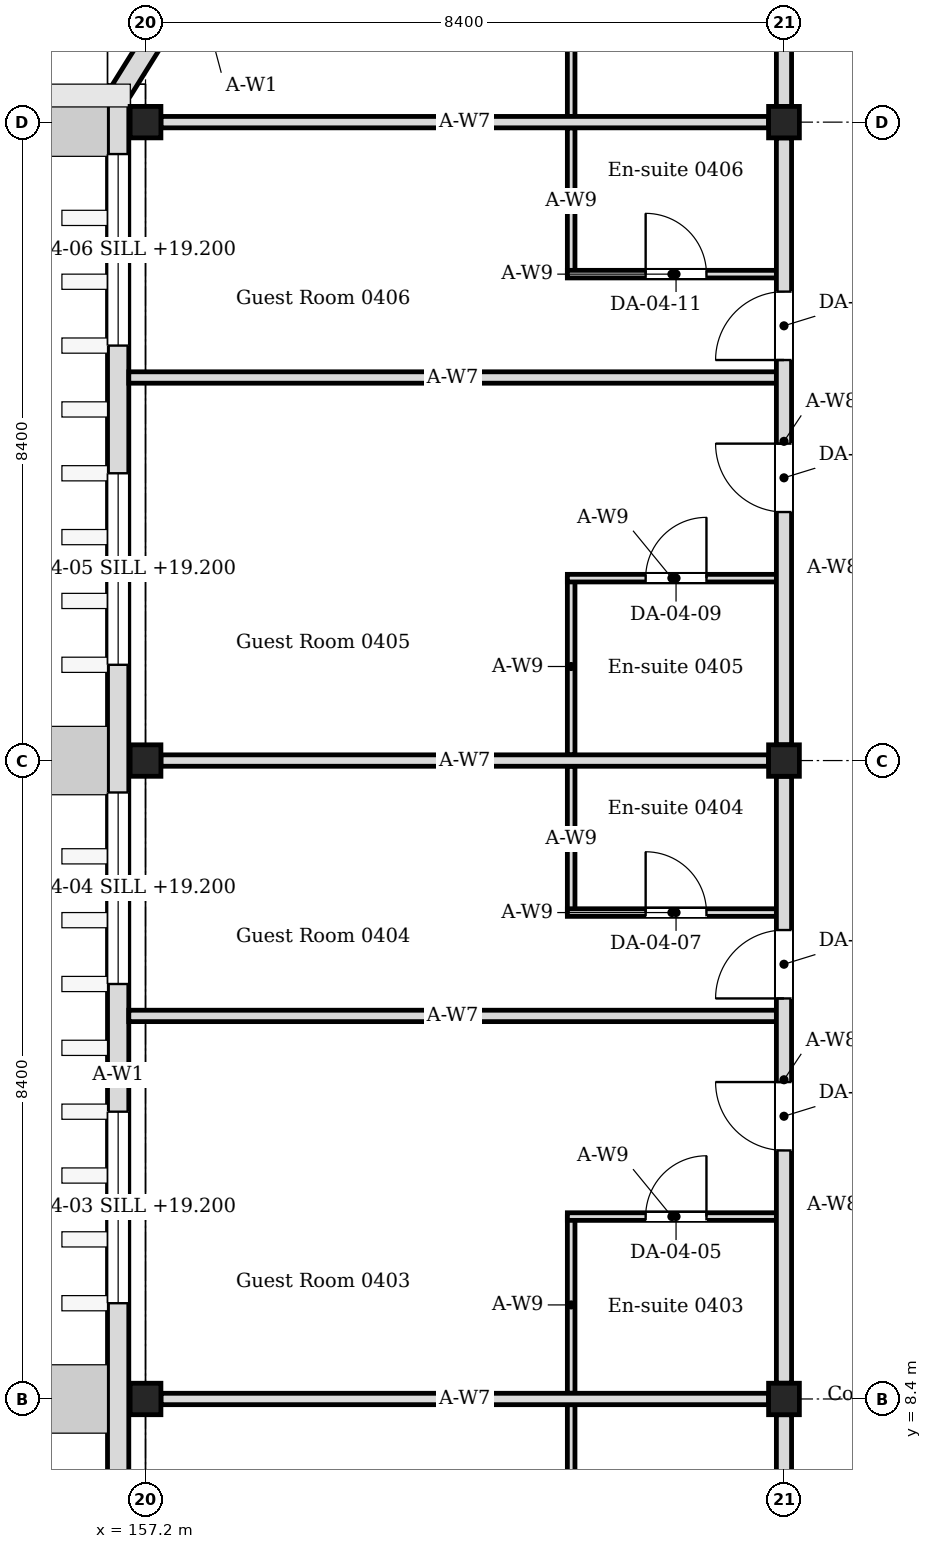
"""IFC4 building model, lengths in metres.
Left out: names, types, materials, properties, quantities, classifications, styles, units other than length and angle.
Written with IfcOpenShell. Run it as: python <this file> out.ifc"""

import sys

from ifc_helpers import new_model, si_unit, direction, frame, frame_2d, origin, origin_2d, place, context, subcontext, project, spatial, rectangle, i_section, extrude, element, fill, save


model = new_model("IFC4")
c1 = context("Model", 3, precision=1e-05, world=origin(), true_north=direction((0.0, 1.0)))
c2 = subcontext(c1, "Body", "Model", "MODEL_VIEW")
j1 = project(units=[si_unit("LENGTHUNIT", "METRE"), si_unit("PLANEANGLEUNIT", "RADIAN")], contexts=[c1])
p1 = place(None, origin())
s1 = spatial("IfcSite", under=j1, at=p1, CompositionType="ELEMENT")
p2 = place(p1, origin())
s2 = spatial("IfcBuilding", under=s1, at=p2, CompositionType="ELEMENT")
p3 = place(p2, frame((0.0, 0.0, 18.6)))
s3 = spatial("IfcBuildingStorey", under=s2, at=p3, CompositionType="ELEMENT", Elevation=18.6)
for number, where, z_axis, x_axis in (
    (1, (157.2, 8.4, 0.0), (0.0, 0.0, 1.0), (1.0, 0.0, 0.0)),
    (2, (157.2, 16.8, 0.0), (0.0, 0.0, 1.0), (1.0, 0.0, 0.0)),
    (3, (157.2, 25.2, 0.0), (0.0, 0.0, 1.0), (1.0, 0.0, 0.0)),
    (4, (165.6, 8.4, 0.0), (0.0, 0.0, 1.0), (1.0, 0.0, 0.0)),
    (5, (165.6, 16.8, 0.0), (0.0, 0.0, 1.0), (1.0, 0.0, 0.0)),
    (6, (165.6, 25.2, 0.0), (0.0, 0.0, 1.0), (1.0, 0.0, 0.0)),
):
    element("IfcColumn", number, at=place(p3, frame(where, z_axis=z_axis, x_axis=x_axis)), inside=s3, PredefinedType="COLUMN", context=c2, shape_type="SweptSolid", body=[
        extrude(i_section(OverallWidth=0.405, OverallDepth=0.414, WebThickness=0.018, FlangeThickness=0.028, FilletRadius=0.022, at=origin_2d()), origin(), (0.0, 0.0, 1.0), 4.2),
    ])
p4 = place(p3, frame((156.84, -0.22, 0.0), z_axis=(0.0, 0.0, 1.0), x_axis=(0.0, 1.0, 0.0)))
e7 = element("IfcWall", 7, at=p4, inside=s3, PredefinedType="SOLIDWALL", context=c2, shape_type="SweptSolid", body=[
    extrude(rectangle(XDim=25.77, YDim=0.28, at=frame_2d((12.885, 0.0))), origin(), (0.0, 0.0, 1.0), 4.05),
])
p5 = place(p4, frame((0.64, 0.0, 0.6)))
e8 = element("IfcOpeningElement", 8, at=p5, cuts=e7, PredefinedType="OPENING", context=c2, shape_type="SweptSolid", body=[
    extrude(rectangle(XDim=2.52, YDim=2.4, at=frame_2d((1.26, 1.2))), frame((0.0, 0.15, 0.0), z_axis=(0.0, -1.0, 0.0), x_axis=(1.0, 0.0, 0.0)), (0.0, 0.0, 1.0), 0.3),
])
p6 = place(p4, frame((4.84, 0.0, 0.6)))
e9 = element("IfcOpeningElement", 9, at=p6, cuts=e7, PredefinedType="OPENING", context=c2, shape_type="SweptSolid", body=[
    extrude(rectangle(XDim=2.52, YDim=2.4, at=frame_2d((1.26, 1.2))), frame((0.0, 0.15, 0.0), z_axis=(0.0, -1.0, 0.0), x_axis=(1.0, 0.0, 0.0)), (0.0, 0.0, 1.0), 0.3),
])
p7 = place(p4, frame((9.88, 0.0, 0.6)))
e10 = element("IfcOpeningElement", 10, at=p7, cuts=e7, PredefinedType="OPENING", context=c2, shape_type="SweptSolid", body=[
    extrude(rectangle(XDim=2.52, YDim=2.4, at=frame_2d((1.26, 1.2))), frame((0.0, 0.15, 0.0), z_axis=(0.0, -1.0, 0.0), x_axis=(1.0, 0.0, 0.0)), (0.0, 0.0, 1.0), 0.3),
])
p8 = place(p4, frame((14.08, 0.0, 0.6)))
e11 = element("IfcOpeningElement", 11, at=p8, cuts=e7, PredefinedType="OPENING", context=c2, shape_type="SweptSolid", body=[
    extrude(rectangle(XDim=2.52, YDim=2.4, at=frame_2d((1.26, 1.2))), frame((0.0, 0.15, 0.0), z_axis=(0.0, -1.0, 0.0), x_axis=(1.0, 0.0, 0.0)), (0.0, 0.0, 1.0), 0.3),
])
p9 = place(p4, frame((18.28, 0.0, 0.6)))
e12 = element("IfcOpeningElement", 12, at=p9, cuts=e7, PredefinedType="OPENING", context=c2, shape_type="SweptSolid", body=[
    extrude(rectangle(XDim=2.52, YDim=2.4, at=frame_2d((1.26, 1.2))), frame((0.0, 0.15, 0.0), z_axis=(0.0, -1.0, 0.0), x_axis=(1.0, 0.0, 0.0)), (0.0, 0.0, 1.0), 0.3),
])
p10 = place(p4, frame((22.48, 0.0, 0.6)))
e13 = element("IfcOpeningElement", 13, at=p10, cuts=e7, PredefinedType="OPENING", context=c2, shape_type="SweptSolid", body=[
    extrude(rectangle(XDim=2.52, YDim=2.4, at=frame_2d((1.26, 1.2))), frame((0.0, 0.15, 0.0), z_axis=(0.0, -1.0, 0.0), x_axis=(1.0, 0.0, 0.0)), (0.0, 0.0, 1.0), 0.3),
])
p11 = place(p3, frame((156.886, 25.624, 0.0), z_axis=(0.0, 0.0, 1.0), x_axis=(0.528992500338, 0.848626498871, 0.0)))
e14 = element("IfcWall", 14, at=p11, inside=s3, PredefinedType="SOLIDWALL", context=c2, shape_type="SweptSolid", body=[
    extrude(rectangle(XDim=4.145, YDim=0.28, at=frame_2d((2.072, 0.0))), origin(), (0.0, 0.0, 1.0), 4.05),
])
p12 = place(p11, frame((0.812, 0.0, 0.6)))
e15 = element("IfcOpeningElement", 15, at=p12, cuts=e14, PredefinedType="OPENING", context=c2, shape_type="SweptSolid", body=[
    extrude(rectangle(XDim=2.52, YDim=2.4, at=frame_2d((1.26, 1.2))), frame((0.0, 0.15, 0.0), z_axis=(0.0, -1.0, 0.0), x_axis=(1.0, 0.0, 0.0)), (0.0, 0.0, 1.0), 0.3),
])
for number, where, z_axis, x_axis in (
    (16, (162.8, 6.0, 0.0), (0.0, 0.0, 1.0), (0.0, 1.0, 0.0)),
    (17, (162.8, 8.475, 0.0), (0.0, 0.0, 1.0), (0.0, 1.0, 0.0)),
):
    element("IfcWall", number, at=place(p3, frame(where, z_axis=z_axis, x_axis=x_axis)), inside=s3, PredefinedType="PARTITIONING", context=c2, shape_type="SweptSolid", body=[
        extrude(rectangle(XDim=2.325, YDim=0.1, at=frame_2d((1.163, 0.0))), origin(), (0.0, 0.0, 1.0), 4.05),
    ])
p13 = place(p3, frame((162.75, 10.8, 0.0), z_axis=(0.0, 0.0, 1.0), x_axis=(1.0, 0.0, 0.0)))
e18 = element("IfcWall", 18, at=p13, inside=s3, PredefinedType="PARTITIONING", context=c2, shape_type="SweptSolid", body=[
    extrude(rectangle(XDim=2.75, YDim=0.1, at=frame_2d((1.375, 0.0))), origin(), (0.0, 0.0, 1.0), 4.05),
])
p14 = place(p13, frame((1.03, 0.0, 0.0)))
e19 = element("IfcOpeningElement", 19, at=p14, cuts=e18, PredefinedType="OPENING", context=c2, shape_type="SweptSolid", body=[
    extrude(rectangle(XDim=0.8, YDim=2.1, at=frame_2d((0.4, 1.05))), frame((0.0, 0.06, 0.0), z_axis=(0.0, -1.0, 0.0), x_axis=(1.0, 0.0, 0.0)), (0.0, 0.0, 1.0), 0.12),
])
p15 = place(p3, frame((162.8, 14.8, 0.0), z_axis=(0.0, 0.0, 1.0), x_axis=(0.0, 1.0, 0.0)))
e20 = element("IfcWall", 20, at=p15, inside=s3, PredefinedType="PARTITIONING", context=c2, shape_type="SweptSolid", body=[
    extrude(rectangle(XDim=1.925, YDim=0.1, at=frame_2d((0.962, 0.0))), origin(), (0.0, 0.0, 1.0), 4.05),
])
p16 = place(p3, frame((162.75, 14.8, 0.0), z_axis=(0.0, 0.0, 1.0), x_axis=(1.0, 0.0, 0.0)))
e21 = element("IfcWall", 21, at=p16, inside=s3, PredefinedType="PARTITIONING", context=c2, shape_type="SweptSolid", body=[
    extrude(rectangle(XDim=2.75, YDim=0.1, at=frame_2d((1.375, 0.0))), origin(), (0.0, 0.0, 1.0), 4.05),
])
p17 = place(p16, frame((1.03, 0.0, 0.0)))
e22 = element("IfcOpeningElement", 22, at=p17, cuts=e21, PredefinedType="OPENING", context=c2, shape_type="SweptSolid", body=[
    extrude(rectangle(XDim=0.8, YDim=2.1, at=frame_2d((0.4, 1.05))), frame((0.0, 0.06, 0.0), z_axis=(0.0, -1.0, 0.0), x_axis=(1.0, 0.0, 0.0)), (0.0, 0.0, 1.0), 0.12),
])
p18 = place(p3, frame((162.8, 16.875, 0.0), z_axis=(0.0, 0.0, 1.0), x_axis=(0.0, 1.0, 0.0)))
e23 = element("IfcWall", 23, at=p18, inside=s3, PredefinedType="PARTITIONING", context=c2, shape_type="SweptSolid", body=[
    extrude(rectangle(XDim=2.325, YDim=0.1, at=frame_2d((1.163, 0.0))), origin(), (0.0, 0.0, 1.0), 4.05),
])
p19 = place(p3, frame((162.75, 19.2, 0.0), z_axis=(0.0, 0.0, 1.0), x_axis=(1.0, 0.0, 0.0)))
e24 = element("IfcWall", 24, at=p19, inside=s3, PredefinedType="PARTITIONING", context=c2, shape_type="SweptSolid", body=[
    extrude(rectangle(XDim=2.75, YDim=0.1, at=frame_2d((1.375, 0.0))), origin(), (0.0, 0.0, 1.0), 4.05),
])
p20 = place(p19, frame((1.03, 0.0, 0.0)))
e25 = element("IfcOpeningElement", 25, at=p20, cuts=e24, PredefinedType="OPENING", context=c2, shape_type="SweptSolid", body=[
    extrude(rectangle(XDim=0.8, YDim=2.1, at=frame_2d((0.4, 1.05))), frame((0.0, 0.06, 0.0), z_axis=(0.0, -1.0, 0.0), x_axis=(1.0, 0.0, 0.0)), (0.0, 0.0, 1.0), 0.12),
])
p21 = place(p3, frame((162.8, 23.2, 0.0), z_axis=(0.0, 0.0, 1.0), x_axis=(0.0, 1.0, 0.0)))
e26 = element("IfcWall", 26, at=p21, inside=s3, PredefinedType="PARTITIONING", context=c2, shape_type="SweptSolid", body=[
    extrude(rectangle(XDim=1.925, YDim=0.1, at=frame_2d((0.962, 0.0))), origin(), (0.0, 0.0, 1.0), 4.05),
])
p22 = place(p3, frame((162.75, 23.2, 0.0), z_axis=(0.0, 0.0, 1.0), x_axis=(1.0, 0.0, 0.0)))
e27 = element("IfcWall", 27, at=p22, inside=s3, PredefinedType="PARTITIONING", context=c2, shape_type="SweptSolid", body=[
    extrude(rectangle(XDim=2.75, YDim=0.1, at=frame_2d((1.375, 0.0))), origin(), (0.0, 0.0, 1.0), 4.05),
])
p23 = place(p22, frame((1.03, 0.0, 0.0)))
e28 = element("IfcOpeningElement", 28, at=p23, cuts=e27, PredefinedType="OPENING", context=c2, shape_type="SweptSolid", body=[
    extrude(rectangle(XDim=0.8, YDim=2.1, at=frame_2d((0.4, 1.05))), frame((0.0, 0.06, 0.0), z_axis=(0.0, -1.0, 0.0), x_axis=(1.0, 0.0, 0.0)), (0.0, 0.0, 1.0), 0.12),
])
p24 = place(p3, frame((162.8, 25.275, 0.0), z_axis=(0.0, 0.0, 1.0), x_axis=(0.0, 1.0, 0.0)))
e29 = element("IfcWall", 29, at=p24, inside=s3, PredefinedType="PARTITIONING", context=c2, shape_type="SweptSolid", body=[
    extrude(rectangle(XDim=2.325, YDim=0.1, at=frame_2d((1.163, 0.0))), origin(), (0.0, 0.0, 1.0), 4.05),
])
for number, where, z_axis, x_axis in (
    (30, (157.403, 8.4, 0.0), (0.0, 0.0, 1.0), (1.0, 0.0, 0.0)),
    (31, (157.403, 16.8, 0.0), (0.0, 0.0, 1.0), (1.0, 0.0, 0.0)),
    (32, (157.403, 25.2, 0.0), (0.0, 0.0, 1.0), (1.0, 0.0, 0.0)),
):
    element("IfcWall", number, at=place(p3, frame(where, z_axis=z_axis, x_axis=x_axis)), inside=s3, PredefinedType="PARTITIONING", context=c2, shape_type="SweptSolid", body=[
        extrude(rectangle(XDim=7.995, YDim=0.15, at=frame_2d((3.998, 0.0))), origin(), (0.0, 0.0, 1.0), 3.604),
    ])
for number, where, z_axis, x_axis in (
    (33, (156.98, 13.44, 0.0), (0.0, 0.0, 1.0), (1.0, 0.0, 0.0)),
    (34, (156.98, 21.84, 0.0), (0.0, 0.0, 1.0), (1.0, 0.0, 0.0)),
):
    element("IfcWall", number, at=place(p3, frame(where, z_axis=z_axis, x_axis=x_axis)), inside=s3, PredefinedType="PARTITIONING", context=c2, shape_type="SweptSolid", body=[
        extrude(rectangle(XDim=8.52, YDim=0.15, at=frame_2d((4.26, 0.0))), origin(), (0.0, 0.0, 1.0), 3.604),
    ])
p25 = place(p3, frame((165.6, 0.207, 0.0), z_axis=(0.0, 0.0, 1.0), x_axis=(0.0, 1.0, 0.0)))
e35 = element("IfcWall", 35, at=p25, inside=s3, PredefinedType="PARTITIONING", context=c2, shape_type="SweptSolid", body=[
    extrude(rectangle(XDim=7.986, YDim=0.2, at=frame_2d((3.993, 0.0))), origin(), (0.0, 0.0, 1.0), 3.45),
])
p26 = place(p25, frame((2.023, 0.0, 0.0)))
e36 = element("IfcOpeningElement", 36, at=p26, cuts=e35, PredefinedType="OPENING", context=c2, shape_type="SweptSolid", body=[
    extrude(rectangle(XDim=0.9, YDim=2.1, at=frame_2d((0.45, 1.05))), frame((0.0, 0.11, 0.0), z_axis=(0.0, -1.0, 0.0), x_axis=(1.0, 0.0, 0.0)), (0.0, 0.0, 1.0), 0.22),
])
p27 = place(p25, frame((4.023, 0.0, 0.0)))
e37 = element("IfcOpeningElement", 37, at=p27, cuts=e35, PredefinedType="OPENING", context=c2, shape_type="SweptSolid", body=[
    extrude(rectangle(XDim=0.9, YDim=2.1, at=frame_2d((0.45, 1.05))), frame((0.0, 0.11, 0.0), z_axis=(0.0, -1.0, 0.0), x_axis=(1.0, 0.0, 0.0)), (0.0, 0.0, 1.0), 0.22),
])
p28 = place(p3, frame((165.6, 8.607, 0.0), z_axis=(0.0, 0.0, 1.0), x_axis=(0.0, 1.0, 0.0)))
e38 = element("IfcWall", 38, at=p28, inside=s3, PredefinedType="PARTITIONING", context=c2, shape_type="SweptSolid", body=[
    extrude(rectangle(XDim=7.986, YDim=0.2, at=frame_2d((3.993, 0.0))), origin(), (0.0, 0.0, 1.0), 3.45),
])
p29 = place(p28, frame((3.063, 0.0, 0.0)))
e39 = element("IfcOpeningElement", 39, at=p29, cuts=e38, PredefinedType="OPENING", context=c2, shape_type="SweptSolid", body=[
    extrude(rectangle(XDim=0.9, YDim=2.1, at=frame_2d((0.45, 1.05))), frame((0.0, 0.11, 0.0), z_axis=(0.0, -1.0, 0.0), x_axis=(1.0, 0.0, 0.0)), (0.0, 0.0, 1.0), 0.22),
])
p30 = place(p28, frame((5.063, 0.0, 0.0)))
e40 = element("IfcOpeningElement", 40, at=p30, cuts=e38, PredefinedType="OPENING", context=c2, shape_type="SweptSolid", body=[
    extrude(rectangle(XDim=0.9, YDim=2.1, at=frame_2d((0.45, 1.05))), frame((0.0, 0.11, 0.0), z_axis=(0.0, -1.0, 0.0), x_axis=(1.0, 0.0, 0.0)), (0.0, 0.0, 1.0), 0.22),
])
p31 = place(p3, frame((165.6, 17.007, 0.0), z_axis=(0.0, 0.0, 1.0), x_axis=(0.0, 1.0, 0.0)))
e41 = element("IfcWall", 41, at=p31, inside=s3, PredefinedType="PARTITIONING", context=c2, shape_type="SweptSolid", body=[
    extrude(rectangle(XDim=7.986, YDim=0.2, at=frame_2d((3.993, 0.0))), origin(), (0.0, 0.0, 1.0), 3.45),
])
p32 = place(p31, frame((3.063, 0.0, 0.0)))
e42 = element("IfcOpeningElement", 42, at=p32, cuts=e41, PredefinedType="OPENING", context=c2, shape_type="SweptSolid", body=[
    extrude(rectangle(XDim=0.9, YDim=2.1, at=frame_2d((0.45, 1.05))), frame((0.0, 0.11, 0.0), z_axis=(0.0, -1.0, 0.0), x_axis=(1.0, 0.0, 0.0)), (0.0, 0.0, 1.0), 0.22),
])
p33 = place(p31, frame((5.063, 0.0, 0.0)))
e43 = element("IfcOpeningElement", 43, at=p33, cuts=e41, PredefinedType="OPENING", context=c2, shape_type="SweptSolid", body=[
    extrude(rectangle(XDim=0.9, YDim=2.1, at=frame_2d((0.45, 1.05))), frame((0.0, 0.11, 0.0), z_axis=(0.0, -1.0, 0.0), x_axis=(1.0, 0.0, 0.0)), (0.0, 0.0, 1.0), 0.22),
])
p34 = place(p3, frame((165.6, 25.407, 0.0), z_axis=(0.0, 0.0, 1.0), x_axis=(0.0, 1.0, 0.0)))
e44 = element("IfcWall", 44, at=p34, inside=s3, PredefinedType="PARTITIONING", context=c2, shape_type="SweptSolid", body=[
    extrude(rectangle(XDim=7.986, YDim=0.2, at=frame_2d((3.993, 0.0))), origin(), (0.0, 0.0, 1.0), 3.45),
])
p35 = place(p34, frame((2.643, 0.0, 0.0)))
e45 = element("IfcOpeningElement", 45, at=p35, cuts=e44, PredefinedType="OPENING", context=c2, shape_type="SweptSolid", body=[
    extrude(rectangle(XDim=0.9, YDim=2.1, at=frame_2d((0.45, 1.05))), frame((0.0, 0.11, 0.0), z_axis=(0.0, -1.0, 0.0), x_axis=(1.0, 0.0, 0.0)), (0.0, 0.0, 1.0), 0.22),
])
p36 = place(p34, frame((4.443, 0.0, 0.0)))
e46 = element("IfcOpeningElement", 46, at=p36, cuts=e44, PredefinedType="OPENING", context=c2, shape_type="SweptSolid", body=[
    extrude(rectangle(XDim=0.9, YDim=2.1, at=frame_2d((0.45, 1.05))), frame((0.0, 0.11, 0.0), z_axis=(0.0, -1.0, 0.0), x_axis=(1.0, 0.0, 0.0)), (0.0, 0.0, 1.0), 0.22),
])
p37 = place(p7, origin())
e47 = element("IfcWindow", 47, at=p37, inside=s3, PartitioningType="SINGLE_PANEL", PredefinedType="WINDOW", context=c2, shape_type="SweptSolid", body=[
    extrude(rectangle(XDim=2.52, YDim=2.4, at=frame_2d((1.26, 1.2))), frame((0.0, 0.03, 0.0), z_axis=(0.0, -1.0, 0.0), x_axis=(1.0, 0.0, 0.0)), (0.0, 0.0, 1.0), 0.06),
])
fill(e10, e47)
p38 = place(p8, origin())
e48 = element("IfcWindow", 48, at=p38, inside=s3, PartitioningType="SINGLE_PANEL", PredefinedType="WINDOW", context=c2, shape_type="SweptSolid", body=[
    extrude(rectangle(XDim=2.52, YDim=2.4, at=frame_2d((1.26, 1.2))), frame((0.0, 0.03, 0.0), z_axis=(0.0, -1.0, 0.0), x_axis=(1.0, 0.0, 0.0)), (0.0, 0.0, 1.0), 0.06),
])
fill(e11, e48)
p39 = place(p9, origin())
e49 = element("IfcWindow", 49, at=p39, inside=s3, PartitioningType="SINGLE_PANEL", PredefinedType="WINDOW", context=c2, shape_type="SweptSolid", body=[
    extrude(rectangle(XDim=2.52, YDim=2.4, at=frame_2d((1.26, 1.2))), frame((0.0, 0.03, 0.0), z_axis=(0.0, -1.0, 0.0), x_axis=(1.0, 0.0, 0.0)), (0.0, 0.0, 1.0), 0.06),
])
fill(e12, e49)
p40 = place(p10, origin())
e50 = element("IfcWindow", 50, at=p40, inside=s3, PartitioningType="SINGLE_PANEL", PredefinedType="WINDOW", context=c2, shape_type="SweptSolid", body=[
    extrude(rectangle(XDim=2.52, YDim=2.4, at=frame_2d((1.26, 1.2))), frame((0.0, 0.03, 0.0), z_axis=(0.0, -1.0, 0.0), x_axis=(1.0, 0.0, 0.0)), (0.0, 0.0, 1.0), 0.06),
])
fill(e13, e50)
p41 = place(p14, origin())
e51 = element("IfcDoor", 51, at=p41, inside=s3, OperationType="SINGLE_SWING_RIGHT", PredefinedType="DOOR", context=c2, shape_type="SweptSolid", body=[
    extrude(rectangle(XDim=0.8, YDim=2.1, at=frame_2d((0.4, 1.05))), frame((0.0, 0.025, 0.0), z_axis=(0.0, -1.0, 0.0), x_axis=(1.0, 0.0, 0.0)), (0.0, 0.0, 1.0), 0.05),
])
fill(e19, e51)
p42 = place(p29, origin())
e52 = element("IfcDoor", 52, at=p42, inside=s3, OperationType="SINGLE_SWING_RIGHT", PredefinedType="DOOR", context=c2, shape_type="SweptSolid", body=[
    extrude(rectangle(XDim=0.9, YDim=2.1, at=frame_2d((0.45, 1.05))), frame((0.0, 0.025, 0.0), z_axis=(0.0, -1.0, 0.0), x_axis=(1.0, 0.0, 0.0)), (0.0, 0.0, 1.0), 0.05),
])
fill(e39, e52)
p43 = place(p17, origin())
e53 = element("IfcDoor", 53, at=p43, inside=s3, OperationType="SINGLE_SWING_LEFT", PredefinedType="DOOR", context=c2, shape_type="SweptSolid", body=[
    extrude(rectangle(XDim=0.8, YDim=2.1, at=frame_2d((0.4, 1.05))), frame((0.0, 0.025, 0.0), z_axis=(0.0, -1.0, 0.0), x_axis=(1.0, 0.0, 0.0)), (0.0, 0.0, 1.0), 0.05),
])
fill(e22, e53)
p44 = place(p30, origin())
e54 = element("IfcDoor", 54, at=p44, inside=s3, OperationType="SINGLE_SWING_LEFT", PredefinedType="DOOR", context=c2, shape_type="SweptSolid", body=[
    extrude(rectangle(XDim=0.9, YDim=2.1, at=frame_2d((0.45, 1.05))), frame((0.0, 0.025, 0.0), z_axis=(0.0, -1.0, 0.0), x_axis=(1.0, 0.0, 0.0)), (0.0, 0.0, 1.0), 0.05),
])
fill(e40, e54)
p45 = place(p20, origin())
e55 = element("IfcDoor", 55, at=p45, inside=s3, OperationType="SINGLE_SWING_RIGHT", PredefinedType="DOOR", context=c2, shape_type="SweptSolid", body=[
    extrude(rectangle(XDim=0.8, YDim=2.1, at=frame_2d((0.4, 1.05))), frame((0.0, 0.025, 0.0), z_axis=(0.0, -1.0, 0.0), x_axis=(1.0, 0.0, 0.0)), (0.0, 0.0, 1.0), 0.05),
])
fill(e25, e55)
p46 = place(p32, origin())
e56 = element("IfcDoor", 56, at=p46, inside=s3, OperationType="SINGLE_SWING_RIGHT", PredefinedType="DOOR", context=c2, shape_type="SweptSolid", body=[
    extrude(rectangle(XDim=0.9, YDim=2.1, at=frame_2d((0.45, 1.05))), frame((0.0, 0.025, 0.0), z_axis=(0.0, -1.0, 0.0), x_axis=(1.0, 0.0, 0.0)), (0.0, 0.0, 1.0), 0.05),
])
fill(e42, e56)
p47 = place(p23, origin())
e57 = element("IfcDoor", 57, at=p47, inside=s3, OperationType="SINGLE_SWING_LEFT", PredefinedType="DOOR", context=c2, shape_type="SweptSolid", body=[
    extrude(rectangle(XDim=0.8, YDim=2.1, at=frame_2d((0.4, 1.05))), frame((0.0, 0.025, 0.0), z_axis=(0.0, -1.0, 0.0), x_axis=(1.0, 0.0, 0.0)), (0.0, 0.0, 1.0), 0.05),
])
fill(e28, e57)
p48 = place(p33, origin())
e58 = element("IfcDoor", 58, at=p48, inside=s3, OperationType="SINGLE_SWING_LEFT", PredefinedType="DOOR", context=c2, shape_type="SweptSolid", body=[
    extrude(rectangle(XDim=0.9, YDim=2.1, at=frame_2d((0.45, 1.05))), frame((0.0, 0.025, 0.0), z_axis=(0.0, -1.0, 0.0), x_axis=(1.0, 0.0, 0.0)), (0.0, 0.0, 1.0), 0.05),
])
fill(e43, e58)
save(model, sys.argv[1])
